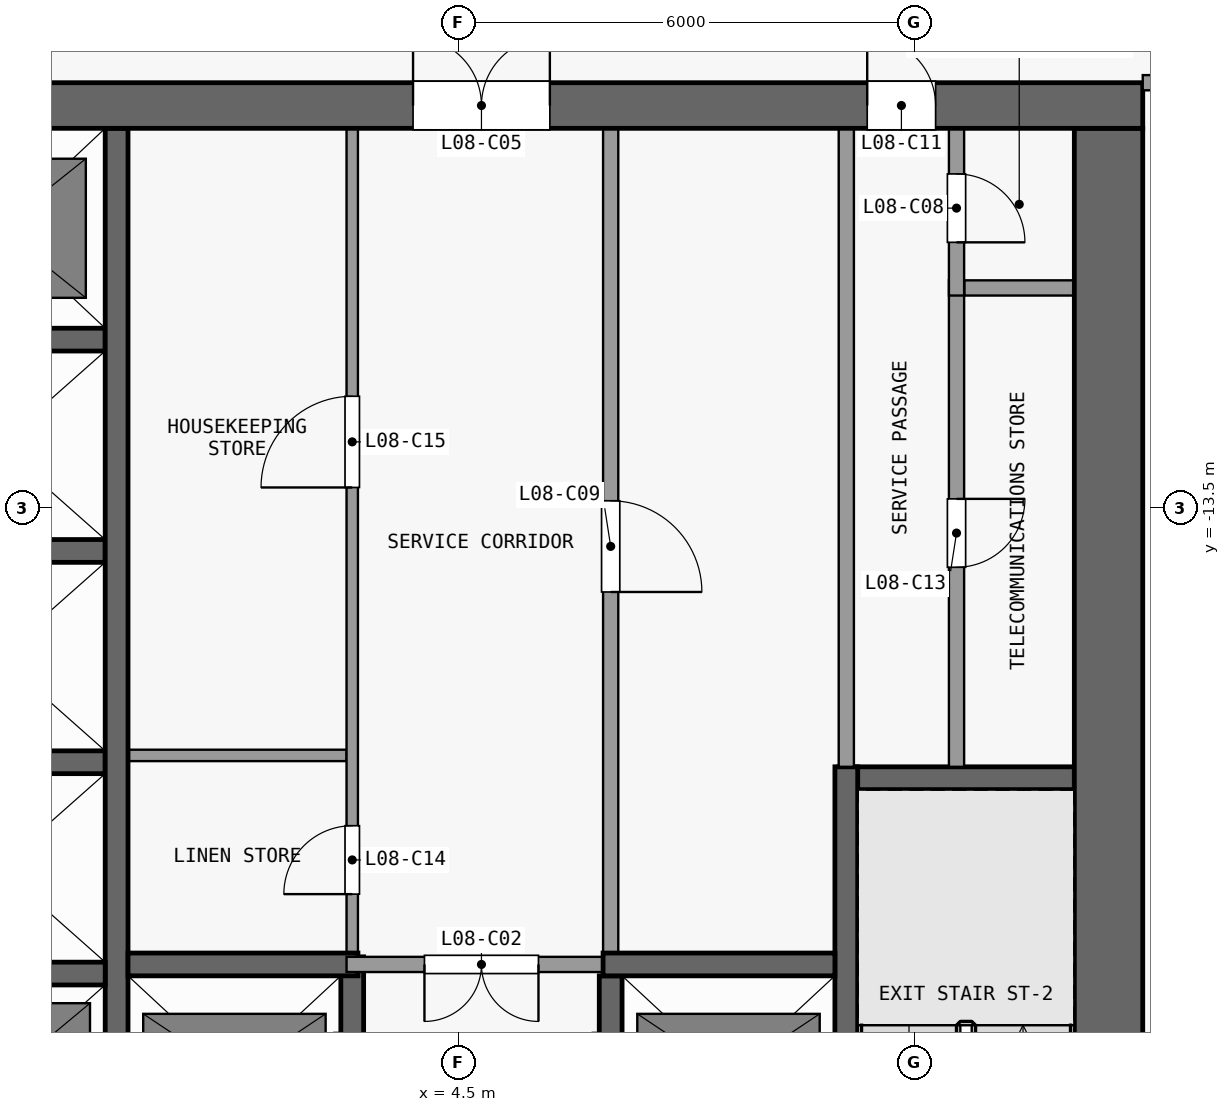
"""IFC4 building model, lengths in metres.
Left out: names, types, materials, properties, quantities, classifications, styles, units other than length and angle.
Written with IfcOpenShell. Run it as: python <this file> out.ifc"""

import sys

from ifc_helpers import new_model, si_unit, direction, frame, frame_2d, origin, place, context, subcontext, project, spatial, rectangle, extrude, element, fill, save


model = new_model("IFC4")
c1 = context("Model", 3, precision=1e-05, world=origin(), true_north=direction((0.0, 1.0)))
c2 = subcontext(c1, "Body", "Model", "MODEL_VIEW")
j1 = project(units=[si_unit("LENGTHUNIT", "METRE"), si_unit("PLANEANGLEUNIT", "RADIAN")], contexts=[c1])
p1 = place(None, origin())
s1 = spatial("IfcSite", under=j1, at=p1, CompositionType="ELEMENT")
p2 = place(p1, origin())
s2 = spatial("IfcBuilding", under=s1, at=p2, CompositionType="ELEMENT")
p3 = place(p2, frame((0.0, 0.0, 39.7)))
s3 = spatial("IfcBuildingStorey", under=s2, at=p3, CompositionType="ELEMENT", Elevation=39.7)
p4 = place(p3, frame((-13.5, -8.2, 0.0), z_axis=(0.0, 0.0, 1.0), x_axis=(1.0, 0.0, 0.0)))
e1 = element("IfcWall", 1, at=p4, inside=s3, PredefinedType="SHEAR", context=c2, shape_type="SweptSolid", body=[
    extrude(rectangle(XDim=27.0, YDim=0.6, at=frame_2d((13.5, 0.0))), origin(), (0.0, 0.0, 1.0), 3.3),
])
p5 = place(p4, frame((7.8, 0.0, 0.0)))
e2 = element("IfcOpeningElement", 2, at=p5, cuts=e1, PredefinedType="OPENING", context=c2, shape_type="SweptSolid", body=[
    extrude(rectangle(XDim=1.8, YDim=2.1, at=frame_2d((0.9, 1.05))), frame((0.0, 0.31, 0.0), z_axis=(0.0, -1.0, 0.0), x_axis=(1.0, 0.0, 0.0)), (0.0, 0.0, 1.0), 0.62),
])
p6 = place(p4, frame((17.4, 0.0, 0.0)))
e3 = element("IfcOpeningElement", 3, at=p6, cuts=e1, PredefinedType="OPENING", context=c2, shape_type="SweptSolid", body=[
    extrude(rectangle(XDim=1.8, YDim=2.1, at=frame_2d((0.9, 1.05))), frame((0.0, 0.31, 0.0), z_axis=(0.0, -1.0, 0.0), x_axis=(1.0, 0.0, 0.0)), (0.0, 0.0, 1.0), 0.62),
])
p7 = place(p4, frame((2.725, 0.0, 0.0)))
e4 = element("IfcOpeningElement", 4, at=p7, cuts=e1, PredefinedType="OPENING", context=c2, shape_type="SweptSolid", body=[
    extrude(rectangle(XDim=0.9, YDim=2.1, at=frame_2d((0.45, 1.05))), frame((0.0, 0.31, 0.0), z_axis=(0.0, -1.0, 0.0), x_axis=(1.0, 0.0, 0.0)), (0.0, 0.0, 1.0), 0.62),
])
p8 = place(p4, frame((23.375, 0.0, 0.0)))
e5 = element("IfcOpeningElement", 5, at=p8, cuts=e1, PredefinedType="OPENING", context=c2, shape_type="SweptSolid", body=[
    extrude(rectangle(XDim=0.9, YDim=2.1, at=frame_2d((0.45, 1.05))), frame((0.0, 0.31, 0.0), z_axis=(0.0, -1.0, 0.0), x_axis=(1.0, 0.0, 0.0)), (0.0, 0.0, 1.0), 0.62),
])
p9 = place(p3, frame((13.05, -24.6, 0.0), z_axis=(0.0, 0.0, 1.0), x_axis=(0.0, 1.0, 0.0)))
e6 = element("IfcWall", 6, at=p9, inside=s3, PredefinedType="SHEAR", context=c2, shape_type="SweptSolid", body=[
    extrude(rectangle(XDim=16.1, YDim=0.9, at=frame_2d((8.05, 0.0))), origin(), (0.0, 0.0, 1.0), 3.3),
])
p10 = place(p3, frame((-2.95, -19.62, 0.0), z_axis=(0.0, 0.0, 1.0), x_axis=(1.0, 0.0, 0.0)))
e7 = element("IfcWall", 7, at=p10, inside=s3, PredefinedType="SHEAR", context=c2, shape_type="SweptSolid", body=[
    extrude(rectangle(XDim=2.8, YDim=0.3, at=frame_2d((1.4, 0.0))), origin(), (0.0, 0.0, 1.0), 3.3),
])
p11 = place(p3, frame((0.15, -19.5, 0.0), z_axis=(0.0, 0.0, 1.0), x_axis=(1.0, 0.0, 0.0)))
e8 = element("IfcWall", 8, at=p11, inside=s3, PredefinedType="SHEAR", context=c2, shape_type="SweptSolid", body=[
    extrude(rectangle(XDim=3.025, YDim=0.3, at=frame_2d((1.513, 0.0))), origin(), (0.0, 0.0, 1.0), 3.3),
])
p12 = place(p3, frame((6.4, -19.5, 0.0), z_axis=(0.0, 0.0, 1.0), x_axis=(-1.0, 0.0, 0.0)))
e9 = element("IfcWall", 9, at=p12, inside=s3, PredefinedType="PARTITIONING", context=c2, shape_type="SweptSolid", body=[
    extrude(rectangle(XDim=3.375, YDim=0.2, at=frame_2d((1.688, 0.0))), origin(), (0.0, 0.0, 1.0), 3.3),
])
p13 = place(p12, frame((0.85, 0.0, 0.0)))
e10 = element("IfcOpeningElement", 10, at=p13, cuts=e9, PredefinedType="OPENING", context=c2, shape_type="SweptSolid", body=[
    extrude(rectangle(XDim=1.5, YDim=2.1, at=frame_2d((0.75, 1.05))), frame((0.0, 0.11, 0.0), z_axis=(0.0, -1.0, 0.0), x_axis=(1.0, 0.0, 0.0)), (0.0, 0.0, 1.0), 0.22),
])
p14 = place(p3, frame((6.4, -19.5, 0.0), z_axis=(0.0, 0.0, 1.0), x_axis=(1.0, 0.0, 0.0)))
e11 = element("IfcWall", 11, at=p14, inside=s3, PredefinedType="SHEAR", context=c2, shape_type="SweptSolid", body=[
    extrude(rectangle(XDim=3.05, YDim=0.3, at=frame_2d((1.525, 0.0))), origin(), (0.0, 0.0, 1.0), 3.3),
])
p15 = place(p3, frame((9.5, -17.05, 0.0), z_axis=(0.0, 0.0, 1.0), x_axis=(1.0, 0.0, 0.0)))
e12 = element("IfcWall", 12, at=p15, inside=s3, PredefinedType="SHEAR", context=c2, shape_type="SweptSolid", body=[
    extrude(rectangle(XDim=3.1, YDim=0.3, at=frame_2d((1.55, 0.0))), origin(), (0.0, 0.0, 1.0), 3.3),
])
p16 = place(p3, frame((-2.95, -16.84, 0.0), z_axis=(0.0, 0.0, 1.0), x_axis=(1.0, 0.0, 0.0)))
e13 = element("IfcWall", 13, at=p16, inside=s3, PredefinedType="SHEAR", context=c2, shape_type="SweptSolid", body=[
    extrude(rectangle(XDim=2.8, YDim=0.3, at=frame_2d((1.4, 0.0))), origin(), (0.0, 0.0, 1.0), 3.3),
])
p17 = place(p3, frame((0.15, -16.75, 0.0), z_axis=(0.0, 0.0, 1.0), x_axis=(1.0, 0.0, 0.0)))
e14 = element("IfcWall", 14, at=p17, inside=s3, PredefinedType="PARTITIONING", context=c2, shape_type="SweptSolid", body=[
    extrude(rectangle(XDim=2.875, YDim=0.15, at=frame_2d((1.438, 0.0))), origin(), (0.0, 0.0, 1.0), 3.3),
])
for number, where, z_axis, x_axis in (
    (15, (-2.95, -14.06, 0.0), (0.0, 0.0, 1.0), (1.0, 0.0, 0.0)),
    (16, (-2.95, -11.28, 0.0), (0.0, 0.0, 1.0), (1.0, 0.0, 0.0)),
):
    element("IfcWall", number, at=place(p3, frame(where, z_axis=z_axis, x_axis=x_axis)), inside=s3, PredefinedType="SHEAR", context=c2, shape_type="SweptSolid", body=[
        extrude(rectangle(XDim=2.8, YDim=0.3, at=frame_2d((1.4, 0.0))), origin(), (0.0, 0.0, 1.0), 3.3),
    ])
p18 = place(p3, frame((11.15, -10.6, 0.0), z_axis=(0.0, 0.0, 1.0), x_axis=(1.0, 0.0, 0.0)))
e17 = element("IfcWall", 17, at=p18, inside=s3, PredefinedType="PARTITIONING", context=c2, shape_type="SweptSolid", body=[
    extrude(rectangle(XDim=1.45, YDim=0.2, at=frame_2d((0.725, 0.0))), origin(), (0.0, 0.0, 1.0), 3.3),
])
p19 = place(p3, frame((0.0, -22.25, 0.0), z_axis=(0.0, 0.0, 1.0), x_axis=(0.0, 1.0, 0.0)))
e18 = element("IfcWall", 18, at=p19, inside=s3, PredefinedType="SHEAR", context=c2, shape_type="SweptSolid", body=[
    extrude(rectangle(XDim=13.75, YDim=0.3, at=frame_2d((6.875, 0.0))), origin(), (0.0, 0.0, 1.0), 3.3),
])
p20 = place(p3, frame((3.1, -22.25, 0.0), z_axis=(0.0, 0.0, 1.0), x_axis=(0.0, 1.0, 0.0)))
e19 = element("IfcWall", 19, at=p20, inside=s3, PredefinedType="SHEAR", context=c2, shape_type="SweptSolid", body=[
    extrude(rectangle(XDim=2.85, YDim=0.3, at=frame_2d((1.425, 0.0))), origin(), (0.0, 0.0, 1.0), 3.3),
])
p21 = place(p20, frame((0.75, 0.0, 0.0)))
e20 = element("IfcOpeningElement", 20, at=p21, cuts=e19, PredefinedType="OPENING", context=c2, shape_type="SweptSolid", body=[
    extrude(rectangle(XDim=1.1, YDim=2.1, at=frame_2d((0.55, 1.05))), frame((0.0, 0.16, 0.0), z_axis=(0.0, -1.0, 0.0), x_axis=(1.0, 0.0, 0.0)), (0.0, 0.0, 1.0), 0.32),
])
p22 = place(p3, frame((3.1, -19.4, 0.0), z_axis=(0.0, 0.0, 1.0), x_axis=(0.0, 1.0, 0.0)))
e21 = element("IfcWall", 21, at=p22, inside=s3, PredefinedType="PARTITIONING", context=c2, shape_type="SweptSolid", body=[
    extrude(rectangle(XDim=10.9, YDim=0.15, at=frame_2d((5.45, 0.0))), origin(), (0.0, 0.0, 1.0), 3.3),
])
p23 = place(p22, frame((0.825, 0.0, 0.0)))
e22 = element("IfcOpeningElement", 22, at=p23, cuts=e21, PredefinedType="OPENING", context=c2, shape_type="SweptSolid", body=[
    extrude(rectangle(XDim=0.9, YDim=2.1, at=frame_2d((0.45, 1.05))), frame((0.0, 0.085, 0.0), z_axis=(0.0, -1.0, 0.0), x_axis=(1.0, 0.0, 0.0)), (0.0, 0.0, 1.0), 0.17),
])
p24 = place(p22, frame((6.175, 0.0, 0.0)))
e23 = element("IfcOpeningElement", 23, at=p24, cuts=e21, PredefinedType="OPENING", context=c2, shape_type="SweptSolid", body=[
    extrude(rectangle(XDim=1.2, YDim=2.1, at=frame_2d((0.6, 1.05))), frame((0.0, 0.085, 0.0), z_axis=(0.0, -1.0, 0.0), x_axis=(1.0, 0.0, 0.0)), (0.0, 0.0, 1.0), 0.17),
])
p25 = place(p3, frame((6.5, -22.25, 0.0), z_axis=(0.0, 0.0, 1.0), x_axis=(0.0, 1.0, 0.0)))
e24 = element("IfcWall", 24, at=p25, inside=s3, PredefinedType="SHEAR", context=c2, shape_type="SweptSolid", body=[
    extrude(rectangle(XDim=2.6, YDim=0.3, at=frame_2d((1.3, 0.0))), origin(), (0.0, 0.0, 1.0), 3.3),
])
p26 = place(p25, frame((0.75, 0.0, 0.0)))
e25 = element("IfcOpeningElement", 25, at=p26, cuts=e24, PredefinedType="OPENING", context=c2, shape_type="SweptSolid", body=[
    extrude(rectangle(XDim=1.1, YDim=2.1, at=frame_2d((0.55, 1.05))), frame((0.0, 0.16, 0.0), z_axis=(0.0, -1.0, 0.0), x_axis=(1.0, 0.0, 0.0)), (0.0, 0.0, 1.0), 0.32),
])
p27 = place(p3, frame((6.5, -8.5, 0.0), z_axis=(0.0, 0.0, 1.0), x_axis=(0.0, -1.0, 0.0)))
e26 = element("IfcWall", 26, at=p27, inside=s3, PredefinedType="PARTITIONING", context=c2, shape_type="SweptSolid", body=[
    extrude(rectangle(XDim=10.85, YDim=0.2, at=frame_2d((5.425, 0.0))), origin(), (0.0, 0.0, 1.0), 3.3),
])
p28 = place(p27, frame((4.9, 0.0, 0.0)))
e27 = element("IfcOpeningElement", 27, at=p28, cuts=e26, PredefinedType="OPENING", context=c2, shape_type="SweptSolid", body=[
    extrude(rectangle(XDim=1.2, YDim=2.1, at=frame_2d((0.6, 1.05))), frame((0.0, 0.11, 0.0), z_axis=(0.0, -1.0, 0.0), x_axis=(1.0, 0.0, 0.0)), (0.0, 0.0, 1.0), 0.22),
])
p29 = place(p3, frame((9.6, -16.9, 0.0), z_axis=(0.0, 0.0, 1.0), x_axis=(0.0, -1.0, 0.0)))
e28 = element("IfcWall", 28, at=p29, inside=s3, PredefinedType="SHEAR", context=c2, shape_type="SweptSolid", body=[
    extrude(rectangle(XDim=7.7, YDim=0.3, at=frame_2d((3.85, 0.0))), origin(), (0.0, 0.0, 1.0), 3.3),
])
p30 = place(p29, frame((6.5, 0.0, 0.0)))
e29 = element("IfcOpeningElement", 29, at=p30, cuts=e28, PredefinedType="OPENING", context=c2, shape_type="SweptSolid", body=[
    extrude(rectangle(XDim=1.1, YDim=2.1, at=frame_2d((0.55, 1.05))), frame((0.0, 0.16, 0.0), z_axis=(0.0, -1.0, 0.0), x_axis=(1.0, 0.0, 0.0)), (0.0, 0.0, 1.0), 0.32),
])
p31 = place(p3, frame((9.6, -16.9, 0.0), z_axis=(0.0, 0.0, 1.0), x_axis=(0.0, 1.0, 0.0)))
e30 = element("IfcWall", 30, at=p31, inside=s3, PredefinedType="PARTITIONING", context=c2, shape_type="SweptSolid", body=[
    extrude(rectangle(XDim=8.4, YDim=0.2, at=frame_2d((4.2, 0.0))), origin(), (0.0, 0.0, 1.0), 3.3),
])
p32 = place(p3, frame((11.05, -10.5, 0.0), z_axis=(0.0, 0.0, 1.0), x_axis=(0.0, -1.0, 0.0)))
e31 = element("IfcWall", 31, at=p32, inside=s3, PredefinedType="PARTITIONING", context=c2, shape_type="SweptSolid", body=[
    extrude(rectangle(XDim=6.4, YDim=0.2, at=frame_2d((3.2, 0.0))), origin(), (0.0, 0.0, 1.0), 3.3),
])
p33 = place(p32, frame((2.875, 0.0, 0.0)))
e32 = element("IfcOpeningElement", 32, at=p33, cuts=e31, PredefinedType="OPENING", context=c2, shape_type="SweptSolid", body=[
    extrude(rectangle(XDim=0.9, YDim=2.1, at=frame_2d((0.45, 1.05))), frame((0.0, 0.11, 0.0), z_axis=(0.0, -1.0, 0.0), x_axis=(1.0, 0.0, 0.0)), (0.0, 0.0, 1.0), 0.22),
])
p34 = place(p3, frame((11.05, -8.5, 0.0), z_axis=(0.0, 0.0, 1.0), x_axis=(0.0, -1.0, 0.0)))
e33 = element("IfcWall", 33, at=p34, inside=s3, PredefinedType="PARTITIONING", context=c2, shape_type="SweptSolid", body=[
    extrude(rectangle(XDim=2.2, YDim=0.2, at=frame_2d((1.1, 0.0))), origin(), (0.0, 0.0, 1.0), 3.3),
])
p35 = place(p34, frame((0.6, 0.0, 0.0)))
e34 = element("IfcOpeningElement", 34, at=p35, cuts=e33, PredefinedType="OPENING", context=c2, shape_type="SweptSolid", body=[
    extrude(rectangle(XDim=0.9, YDim=2.1, at=frame_2d((0.45, 1.05))), frame((0.0, 0.11, 0.0), z_axis=(0.0, -1.0, 0.0), x_axis=(1.0, 0.0, 0.0)), (0.0, 0.0, 1.0), 0.22),
])
p36 = place(p3, frame((13.5, -7.9, 0.0), z_axis=(0.0, 0.0, 1.0), x_axis=(1.0, 0.0, 0.0)))
e35 = element("IfcWall", 35, at=p36, inside=s3, PredefinedType="PARTITIONING", context=c2, shape_type="SweptSolid", body=[
    extrude(rectangle(XDim=11.75, YDim=0.2, at=frame_2d((5.875, 0.0))), origin(), (0.0, 0.0, 1.0), 3.3),
])
p37 = place(p36, frame((1.0, 0.0, 0.0)))
e36 = element("IfcOpeningElement", 36, at=p37, cuts=e35, PredefinedType="OPENING", context=c2, shape_type="SweptSolid", body=[
    extrude(rectangle(XDim=1.0, YDim=2.1, at=frame_2d((0.5, 1.05))), frame((0.0, 0.11, 0.0), z_axis=(0.0, -1.0, 0.0), x_axis=(1.0, 0.0, 0.0)), (0.0, 0.0, 1.0), 0.22),
])
p38 = place(p13, origin())
e37 = element("IfcDoor", 37, at=p38, inside=s3, OperationType="DOUBLE_DOOR_SINGLE_SWING", PredefinedType="DOOR", context=c2, shape_type="SweptSolid", body=[
    extrude(rectangle(XDim=1.5, YDim=2.1, at=frame_2d((0.75, 1.05))), frame((0.0, 0.025, 0.0), z_axis=(0.0, -1.0, 0.0), x_axis=(1.0, 0.0, 0.0)), (0.0, 0.0, 1.0), 0.05),
])
fill(e10, e37)
p39 = place(p6, origin())
e38 = element("IfcDoor", 38, at=p39, inside=s3, OperationType="DOUBLE_DOOR_SINGLE_SWING", PredefinedType="DOOR", context=c2, shape_type="SweptSolid", body=[
    extrude(rectangle(XDim=1.8, YDim=2.1, at=frame_2d((0.9, 1.05))), frame((0.0, 0.025, 0.0), z_axis=(0.0, -1.0, 0.0), x_axis=(1.0, 0.0, 0.0)), (0.0, 0.0, 1.0), 0.05),
])
fill(e3, e38)
p40 = place(p35, origin())
e39 = element("IfcDoor", 39, at=p40, inside=s3, OperationType="SINGLE_SWING_RIGHT", PredefinedType="DOOR", context=c2, shape_type="SweptSolid", body=[
    extrude(rectangle(XDim=0.9, YDim=2.1, at=frame_2d((0.45, 1.05))), frame((0.0, 0.025, 0.0), z_axis=(0.0, -1.0, 0.0), x_axis=(1.0, 0.0, 0.0)), (0.0, 0.0, 1.0), 0.05),
])
fill(e34, e39)
p41 = place(p28, origin())
e40 = element("IfcDoor", 40, at=p41, inside=s3, OperationType="SINGLE_SWING_RIGHT", PredefinedType="DOOR", context=c2, shape_type="SweptSolid", body=[
    extrude(rectangle(XDim=1.2, YDim=2.1, at=frame_2d((0.6, 1.05))), frame((0.0, 0.025, 0.0), z_axis=(0.0, -1.0, 0.0), x_axis=(1.0, 0.0, 0.0)), (0.0, 0.0, 1.0), 0.05),
])
fill(e27, e40)
p42 = place(p8, origin())
e41 = element("IfcDoor", 41, at=p42, inside=s3, OperationType="SINGLE_SWING_LEFT", PredefinedType="DOOR", context=c2, shape_type="SweptSolid", body=[
    extrude(rectangle(XDim=0.9, YDim=2.1, at=frame_2d((0.45, 1.05))), frame((0.0, 0.025, 0.0), z_axis=(0.0, -1.0, 0.0), x_axis=(1.0, 0.0, 0.0)), (0.0, 0.0, 1.0), 0.05),
])
fill(e5, e41)
p43 = place(p33, origin())
e42 = element("IfcDoor", 42, at=p43, inside=s3, OperationType="SINGLE_SWING_LEFT", PredefinedType="DOOR", context=c2, shape_type="SweptSolid", body=[
    extrude(rectangle(XDim=0.9, YDim=2.1, at=frame_2d((0.45, 1.05))), frame((0.0, 0.025, 0.0), z_axis=(0.0, -1.0, 0.0), x_axis=(1.0, 0.0, 0.0)), (0.0, 0.0, 1.0), 0.05),
])
fill(e32, e42)
p44 = place(p23, origin())
e43 = element("IfcDoor", 43, at=p44, inside=s3, OperationType="SINGLE_SWING_LEFT", PredefinedType="DOOR", context=c2, shape_type="SweptSolid", body=[
    extrude(rectangle(XDim=0.9, YDim=2.1, at=frame_2d((0.45, 1.05))), frame((0.0, 0.025, 0.0), z_axis=(0.0, -1.0, 0.0), x_axis=(1.0, 0.0, 0.0)), (0.0, 0.0, 1.0), 0.05),
])
fill(e22, e43)
p45 = place(p24, origin())
e44 = element("IfcDoor", 44, at=p45, inside=s3, OperationType="SINGLE_SWING_LEFT", PredefinedType="DOOR", context=c2, shape_type="SweptSolid", body=[
    extrude(rectangle(XDim=1.2, YDim=2.1, at=frame_2d((0.6, 1.05))), frame((0.0, 0.025, 0.0), z_axis=(0.0, -1.0, 0.0), x_axis=(1.0, 0.0, 0.0)), (0.0, 0.0, 1.0), 0.05),
])
fill(e23, e44)
save(model, sys.argv[1])
